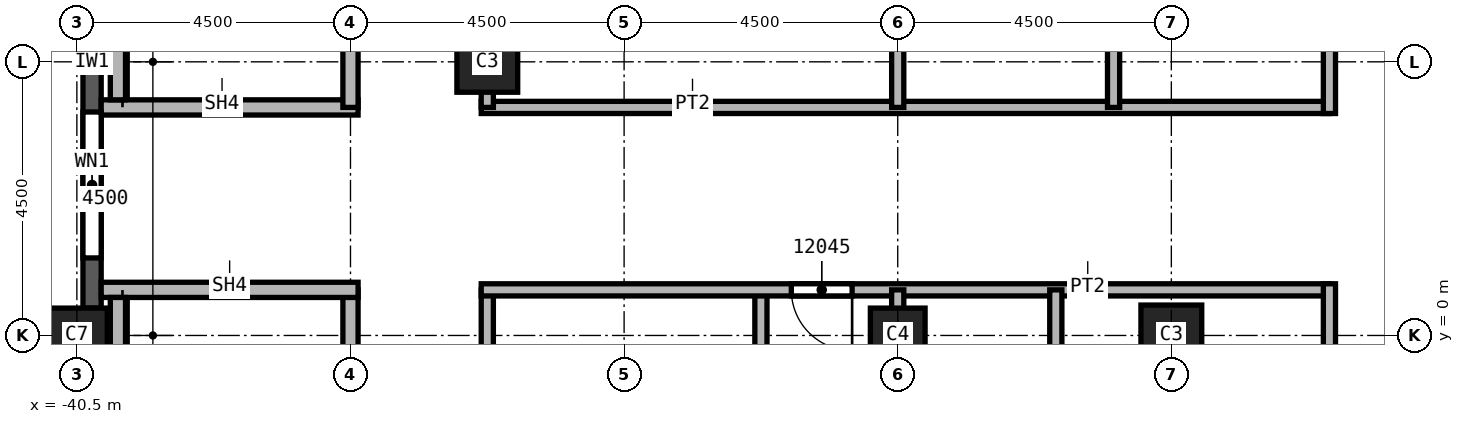
"""IFC4 building model, lengths in metres.
Left out: names, types, materials, properties, quantities, classifications, styles, units other than length and angle.
Written with IfcOpenShell. Run it as: python <this file> out.ifc"""

import sys

from ifc_helpers import new_model, si_unit, direction, frame, frame_2d, origin, origin_2d, place, context, subcontext, project, spatial, rectangle, extrude, element, fill, save


model = new_model("IFC4")
c1 = context("Model", 3, precision=1e-05, world=origin(), true_north=direction((0.0, 1.0)))
c2 = subcontext(c1, "Body", "Model", "MODEL_VIEW")
j1 = project(units=[si_unit("LENGTHUNIT", "METRE"), si_unit("PLANEANGLEUNIT", "RADIAN")], contexts=[c1])
p1 = place(None, origin())
s1 = spatial("IfcSite", under=j1, at=p1, CompositionType="ELEMENT")
p2 = place(p1, origin())
s2 = spatial("IfcBuilding", under=s1, at=p2, CompositionType="ELEMENT")
p3 = place(p2, frame((0.0, 0.0, 196.0)))
s3 = spatial("IfcBuildingStorey", under=s2, at=p3, CompositionType="ELEMENT", Elevation=196.0)
p4 = place(p3, frame((-40.5, 0.0, 0.0), z_axis=(0.0, 0.0, 1.0), x_axis=(0.0, 1.0, 0.0)))
e1 = element("IfcColumn", 1, at=p4, inside=s3, PredefinedType="COLUMN", context=c2, shape_type="SweptSolid", body=[
    extrude(rectangle(XDim=0.9, YDim=1.0, at=origin_2d()), origin(), (0.0, 0.0, 1.0), 3.72),
])
for number, where, z_axis, x_axis in (
    (2, (-33.75, 4.5, 0.0), (0.0, 0.0, 1.0), (1.0, 0.0, 0.0)),
    (3, (-22.5, 0.0, 0.0), (0.0, 0.0, 1.0), (1.0, 0.0, 0.0)),
):
    element("IfcColumn", number, at=place(p3, frame(where, z_axis=z_axis, x_axis=x_axis)), inside=s3, PredefinedType="COLUMN", context=c2, shape_type="SweptSolid", body=[
        extrude(rectangle(XDim=1.0, YDim=1.0, at=origin_2d()), origin(), (0.0, 0.0, 1.0), 3.72),
    ])
p5 = place(p3, frame((-27.0, 0.0, 0.0), z_axis=(0.0, 0.0, 1.0), x_axis=(1.0, 0.0, 0.0)))
e4 = element("IfcColumn", 4, at=p5, inside=s3, PredefinedType="COLUMN", context=c2, shape_type="SweptSolid", body=[
    extrude(rectangle(XDim=0.9, YDim=0.9, at=origin_2d()), origin(), (0.0, 0.0, 1.0), 3.72),
])
p6 = place(p3, frame((-40.25, 8.55, 0.0), z_axis=(0.0, 0.0, 1.0), x_axis=(0.0, -1.0, 0.0)))
e5 = element("IfcWall", 5, at=p6, inside=s3, PredefinedType="SOLIDWALL", context=c2, shape_type="SweptSolid", body=[
    extrude(rectangle(XDim=8.1, YDim=0.3, at=frame_2d((4.05, 0.0))), origin(), (0.0, 0.0, 1.0), 3.12),
])
p7 = place(p6, frame((0.825, 0.0, 0.8)))
e6 = element("IfcOpeningElement", 6, at=p7, cuts=e5, PredefinedType="OPENING", context=c2, shape_type="SweptSolid", body=[
    extrude(rectangle(XDim=2.4, YDim=1.95, at=frame_2d((1.2, 0.975))), frame((0.0, 0.15, 0.0), z_axis=(0.0, -1.0, 0.0), x_axis=(1.0, 0.0, 0.0)), (0.0, 0.0, 1.0), 0.3),
])
p8 = place(p6, frame((4.875, 0.0, 0.8)))
e7 = element("IfcOpeningElement", 7, at=p8, cuts=e5, PredefinedType="OPENING", context=c2, shape_type="SweptSolid", body=[
    extrude(rectangle(XDim=2.4, YDim=1.95, at=frame_2d((1.2, 0.975))), frame((0.0, 0.15, 0.0), z_axis=(0.0, -1.0, 0.0), x_axis=(1.0, 0.0, 0.0)), (0.0, 0.0, 1.0), 0.3),
])
p9 = place(p3, frame((-33.85, 3.75, 0.0), z_axis=(0.0, 0.0, 1.0), x_axis=(1.0, 0.0, 0.0)))
e8 = element("IfcWall", 8, at=p9, inside=s3, PredefinedType="PARTITIONING", context=c2, shape_type="SweptSolid", body=[
    extrude(rectangle(XDim=13.95, YDim=0.2, at=frame_2d((6.975, 0.0))), origin(), (0.0, 0.0, 1.0), 3.72),
])
p10 = place(p3, frame((-33.75, 0.75, 0.0), z_axis=(0.0, 0.0, 1.0), x_axis=(0.0, -1.0, 0.0)))
e9 = element("IfcWall", 9, at=p10, inside=s3, PredefinedType="PARTITIONING", context=c2, shape_type="SweptSolid", body=[
    extrude(rectangle(XDim=7.6, YDim=0.2, at=frame_2d((3.8, 0.0))), origin(), (0.0, 0.0, 1.0), 3.72),
])
p11 = place(p10, frame((3.4, 0.0, 0.0)))
e10 = element("IfcOpeningElement", 10, at=p11, cuts=e9, PredefinedType="OPENING", context=c2, shape_type="SweptSolid", body=[
    extrude(rectangle(XDim=1.0, YDim=2.1, at=frame_2d((0.5, 1.05))), frame((0.0, 0.1, 0.0), z_axis=(0.0, -1.0, 0.0), x_axis=(1.0, 0.0, 0.0)), (0.0, 0.0, 1.0), 0.2),
])
p12 = place(p3, frame((-33.75, 11.25, 0.0), z_axis=(0.0, 0.0, 1.0), x_axis=(0.0, -1.0, 0.0)))
e11 = element("IfcWall", 11, at=p12, inside=s3, PredefinedType="PARTITIONING", context=c2, shape_type="SweptSolid", body=[
    extrude(rectangle(XDim=7.5, YDim=0.2, at=frame_2d((3.75, 0.0))), origin(), (0.0, 0.0, 1.0), 3.72),
])
p13 = place(p12, frame((4.9, 0.0, 0.0)))
e12 = element("IfcOpeningElement", 12, at=p13, cuts=e11, PredefinedType="OPENING", context=c2, shape_type="SweptSolid", body=[
    extrude(rectangle(XDim=1.0, YDim=2.1, at=frame_2d((0.5, 1.05))), frame((0.0, 0.1, 0.0), z_axis=(0.0, -1.0, 0.0), x_axis=(1.0, 0.0, 0.0)), (0.0, 0.0, 1.0), 0.2),
])
p14 = place(p3, frame((-29.25, 0.75, 0.0), z_axis=(0.0, 0.0, 1.0), x_axis=(0.0, -1.0, 0.0)))
e13 = element("IfcWall", 13, at=p14, inside=s3, PredefinedType="PARTITIONING", context=c2, shape_type="SweptSolid", body=[
    extrude(rectangle(XDim=18.35, YDim=0.2, at=frame_2d((9.175, 0.0))), origin(), (0.0, 0.0, 1.0), 3.72),
])
p15 = place(p3, frame((-19.9, 0.75, 0.0), z_axis=(0.0, 0.0, 1.0), x_axis=(-1.0, 0.0, 0.0)))
e14 = element("IfcWall", 14, at=p15, inside=s3, PredefinedType="PARTITIONING", context=c2, shape_type="SweptSolid", body=[
    extrude(rectangle(XDim=13.95, YDim=0.2, at=frame_2d((6.975, 0.0))), origin(), (0.0, 0.0, 1.0), 3.72),
])
p16 = place(p15, frame((7.85, 0.0, 0.0)))
e15 = element("IfcOpeningElement", 15, at=p16, cuts=e14, PredefinedType="OPENING", context=c2, shape_type="SweptSolid", body=[
    extrude(rectangle(XDim=1.0, YDim=2.1, at=frame_2d((0.5, 1.05))), frame((0.0, 0.1, 0.0), z_axis=(0.0, -1.0, 0.0), x_axis=(1.0, 0.0, 0.0)), (0.0, 0.0, 1.0), 0.2),
])
p17 = place(p3, frame((-27.0, -17.5, 0.0), z_axis=(0.0, 0.0, 1.0), x_axis=(0.0, 1.0, 0.0)))
e16 = element("IfcWall", 16, at=p17, inside=s3, PredefinedType="PARTITIONING", context=c2, shape_type="SweptSolid", body=[
    extrude(rectangle(XDim=18.25, YDim=0.2, at=frame_2d((9.125, 0.0))), origin(), (0.0, 0.0, 1.0), 3.72),
])
p18 = place(p3, frame((-27.0, 3.75, 0.0), z_axis=(0.0, 0.0, 1.0), x_axis=(0.0, 1.0, 0.0)))
e17 = element("IfcWall", 17, at=p18, inside=s3, PredefinedType="PARTITIONING", context=c2, shape_type="SweptSolid", body=[
    extrude(rectangle(XDim=13.75, YDim=0.2, at=frame_2d((6.875, 0.0))), origin(), (0.0, 0.0, 1.0), 3.72),
])
p19 = place(p3, frame((-24.4, -17.5, 0.0), z_axis=(0.0, 0.0, 1.0), x_axis=(0.0, 1.0, 0.0)))
e18 = element("IfcWall", 18, at=p19, inside=s3, PredefinedType="PARTITIONING", context=c2, shape_type="SweptSolid", body=[
    extrude(rectangle(XDim=18.25, YDim=0.2, at=frame_2d((9.125, 0.0))), origin(), (0.0, 0.0, 1.0), 3.72),
])
p20 = place(p19, frame((14.45, 0.0, 0.0)))
e19 = element("IfcOpeningElement", 19, at=p20, cuts=e18, PredefinedType="OPENING", context=c2, shape_type="SweptSolid", body=[
    extrude(rectangle(XDim=1.0, YDim=2.1, at=frame_2d((0.5, 1.05))), frame((0.0, 0.1, 0.0), z_axis=(0.0, -1.0, 0.0), x_axis=(1.0, 0.0, 0.0)), (0.0, 0.0, 1.0), 0.2),
])
p21 = place(p3, frame((-23.45, 3.75, 0.0), z_axis=(0.0, 0.0, 1.0), x_axis=(0.0, 1.0, 0.0)))
e20 = element("IfcWall", 20, at=p21, inside=s3, PredefinedType="PARTITIONING", context=c2, shape_type="SweptSolid", body=[
    extrude(rectangle(XDim=7.6, YDim=0.2, at=frame_2d((3.8, 0.0))), origin(), (0.0, 0.0, 1.0), 3.72),
])
p22 = place(p21, frame((3.25, 0.0, 0.0)))
e21 = element("IfcOpeningElement", 21, at=p22, cuts=e20, PredefinedType="OPENING", context=c2, shape_type="SweptSolid", body=[
    extrude(rectangle(XDim=1.0, YDim=2.1, at=frame_2d((0.5, 1.05))), frame((0.0, 0.1, 0.0), z_axis=(0.0, -1.0, 0.0), x_axis=(1.0, 0.0, 0.0)), (0.0, 0.0, 1.0), 0.2),
])
p23 = place(p3, frame((-19.9, -22.4, 0.0), z_axis=(0.0, 0.0, 1.0), x_axis=(0.0, 1.0, 0.0)))
e22 = element("IfcWall", 22, at=p23, inside=s3, PredefinedType="PARTITIONING", context=c2, shape_type="SweptSolid", body=[
    extrude(rectangle(XDim=23.25, YDim=0.2, at=frame_2d((11.625, 0.0))), origin(), (0.0, 0.0, 1.0), 3.72),
])
p24 = place(p23, frame((5.55, 0.0, 0.0)))
e23 = element("IfcOpeningElement", 23, at=p24, cuts=e22, PredefinedType="OPENING", context=c2, shape_type="SweptSolid", body=[
    extrude(rectangle(XDim=1.0, YDim=2.1, at=frame_2d((0.5, 1.05))), frame((0.0, 0.1, 0.0), z_axis=(0.0, -1.0, 0.0), x_axis=(1.0, 0.0, 0.0)), (0.0, 0.0, 1.0), 0.2),
])
p25 = place(p23, frame((14.0, 0.0, 0.0)))
e24 = element("IfcOpeningElement", 24, at=p25, cuts=e22, PredefinedType="OPENING", context=c2, shape_type="SweptSolid", body=[
    extrude(rectangle(XDim=1.0, YDim=2.1, at=frame_2d((0.5, 1.05))), frame((0.0, 0.1, 0.0), z_axis=(0.0, -1.0, 0.0), x_axis=(1.0, 0.0, 0.0)), (0.0, 0.0, 1.0), 0.2),
])
p26 = place(p3, frame((-19.9, 3.65, 0.0), z_axis=(0.0, 0.0, 1.0), x_axis=(0.0, 1.0, 0.0)))
e25 = element("IfcWall", 25, at=p26, inside=s3, PredefinedType="PARTITIONING", context=c2, shape_type="SweptSolid", body=[
    extrude(rectangle(XDim=9.95, YDim=0.2, at=frame_2d((4.975, 0.0))), origin(), (0.0, 0.0, 1.0), 3.72),
])
p27 = place(p26, frame((4.3, 0.0, 0.0)))
e26 = element("IfcOpeningElement", 26, at=p27, cuts=e25, PredefinedType="OPENING", context=c2, shape_type="SweptSolid", body=[
    extrude(rectangle(XDim=1.0, YDim=2.1, at=frame_2d((0.5, 1.05))), frame((0.0, 0.1, 0.0), z_axis=(0.0, -1.0, 0.0), x_axis=(1.0, 0.0, 0.0)), (0.0, 0.0, 1.0), 0.2),
])
p28 = place(p26, frame((8.32, 0.0, 0.0)))
e27 = element("IfcOpeningElement", 27, at=p28, cuts=e25, PredefinedType="OPENING", context=c2, shape_type="SweptSolid", body=[
    extrude(rectangle(XDim=0.9, YDim=2.1, at=frame_2d((0.45, 1.05))), frame((0.0, 0.1, 0.0), z_axis=(0.0, -1.0, 0.0), x_axis=(1.0, 0.0, 0.0)), (0.0, 0.0, 1.0), 0.2),
])
p29 = place(p3, frame((-40.1, 3.75, 0.0), z_axis=(0.0, 0.0, 1.0), x_axis=(1.0, 0.0, 0.0)))
e28 = element("IfcWall", 28, at=p29, inside=s3, PredefinedType="SOLIDWALL", context=c2, shape_type="SweptSolid", body=[
    extrude(rectangle(XDim=4.225, YDim=0.25, at=frame_2d((2.113, 0.0))), origin(), (0.0, 0.0, 1.0), 3.72),
])
p30 = place(p3, frame((-36.0, 0.75, 0.0), z_axis=(0.0, 0.0, 1.0), x_axis=(0.0, -1.0, 0.0)))
e29 = element("IfcWall", 29, at=p30, inside=s3, PredefinedType="SOLIDWALL", context=c2, shape_type="SweptSolid", body=[
    extrude(rectangle(XDim=7.625, YDim=0.25, at=frame_2d((3.812, 0.0))), origin(), (0.0, 0.0, 1.0), 3.72),
])
p31 = place(p30, frame((5.95, 0.0, 0.0)))
e30 = element("IfcOpeningElement", 30, at=p31, cuts=e29, PredefinedType="OPENING", context=c2, shape_type="SweptSolid", body=[
    extrude(rectangle(XDim=1.2, YDim=2.1, at=frame_2d((0.6, 1.05))), frame((0.0, 0.125, 0.0), z_axis=(0.0, -1.0, 0.0), x_axis=(1.0, 0.0, 0.0)), (0.0, 0.0, 1.0), 0.25),
])
p32 = place(p3, frame((-36.0, 11.375, 0.0), z_axis=(0.0, 0.0, 1.0), x_axis=(0.0, -1.0, 0.0)))
e31 = element("IfcWall", 31, at=p32, inside=s3, PredefinedType="SOLIDWALL", context=c2, shape_type="SweptSolid", body=[
    extrude(rectangle(XDim=7.625, YDim=0.25, at=frame_2d((3.812, 0.0))), origin(), (0.0, 0.0, 1.0), 3.72),
])
p33 = place(p32, frame((0.4, 0.0, 0.0)))
e32 = element("IfcOpeningElement", 32, at=p33, cuts=e31, PredefinedType="OPENING", context=c2, shape_type="SweptSolid", body=[
    extrude(rectangle(XDim=1.2, YDim=2.1, at=frame_2d((0.6, 1.05))), frame((0.0, 0.125, 0.0), z_axis=(0.0, -1.0, 0.0), x_axis=(1.0, 0.0, 0.0)), (0.0, 0.0, 1.0), 0.25),
])
p34 = place(p3, frame((-35.875, 0.75, 0.0), z_axis=(0.0, 0.0, 1.0), x_axis=(-1.0, 0.0, 0.0)))
e33 = element("IfcWall", 33, at=p34, inside=s3, PredefinedType="SOLIDWALL", context=c2, shape_type="SweptSolid", body=[
    extrude(rectangle(XDim=4.225, YDim=0.25, at=frame_2d((2.113, 0.0))), origin(), (0.0, 0.0, 1.0), 3.72),
])
for number, where, z_axis, x_axis in (
    (34, (-39.825, 3.875, 0.0), (0.0, 0.0, 1.0), (0.0, 1.0, 0.0)),
    (35, (-39.825, -6.625, 0.0), (0.0, 0.0, 1.0), (0.0, 1.0, 0.0)),
):
    element("IfcWall", number, at=place(p3, frame(where, z_axis=z_axis, x_axis=x_axis)), inside=s3, PredefinedType="SOLIDWALL", context=c2, shape_type="SweptSolid", body=[
        extrude(rectangle(XDim=7.25, YDim=0.25, at=frame_2d((3.625, 0.0))), origin(), (0.0, 0.0, 1.0), 3.72),
    ])
p35 = place(p8, origin())
e36 = element("IfcWindow", 36, at=p35, inside=s3, PartitioningType="SINGLE_PANEL", PredefinedType="WINDOW", context=c2, shape_type="SweptSolid", body=[
    extrude(rectangle(XDim=2.4, YDim=1.95, at=frame_2d((1.2, 0.975))), frame((0.0, 0.03, 0.0), z_axis=(0.0, -1.0, 0.0), x_axis=(1.0, 0.0, 0.0)), (0.0, 0.0, 1.0), 0.06),
])
fill(e7, e36)
p36 = place(p16, origin())
e37 = element("IfcDoor", 37, at=p36, inside=s3, OperationType="SINGLE_SWING_RIGHT", PredefinedType="DOOR", context=c2, shape_type="SweptSolid", body=[
    extrude(rectangle(XDim=1.0, YDim=2.1, at=frame_2d((0.5, 1.05))), frame((0.0, 0.025, 0.0), z_axis=(0.0, -1.0, 0.0), x_axis=(1.0, 0.0, 0.0)), (0.0, 0.0, 1.0), 0.05),
])
fill(e15, e37)
save(model, sys.argv[1])
